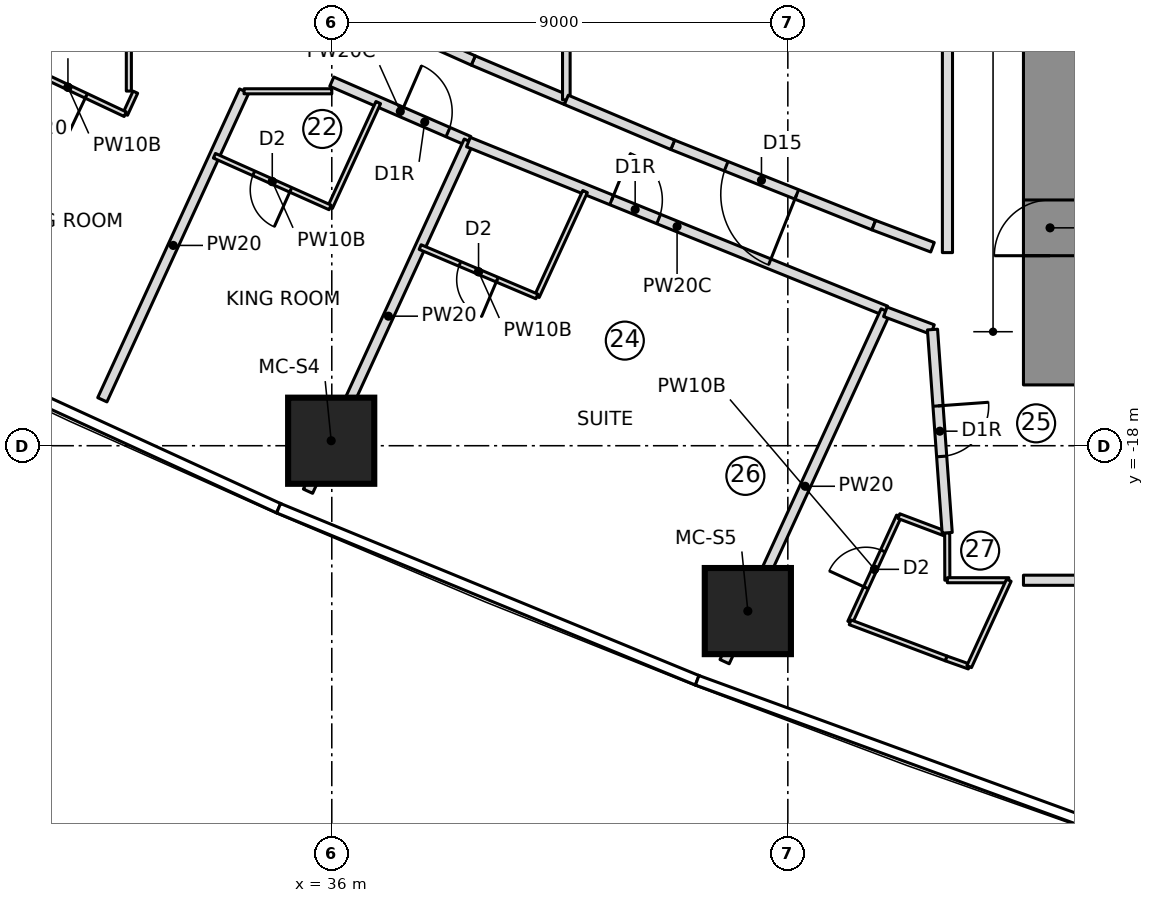
"""IFC4 building model, lengths in metres.
Left out: names, types, materials, properties, quantities, classifications, styles, units other than length and angle.
Written with IfcOpenShell. Run it as: python <this file> out.ifc"""

import sys

from ifc_helpers import new_model, si_unit, direction, frame, frame_2d, origin, origin_2d, place, context, subcontext, project, spatial, rectangle, extrude, element, fill, save


model = new_model("IFC4")
c1 = context("Model", 3, precision=1e-05, world=origin(), true_north=direction((0.0, 1.0)))
c2 = subcontext(c1, "Body", "Model", "MODEL_VIEW")
j1 = project(units=[si_unit("LENGTHUNIT", "METRE"), si_unit("PLANEANGLEUNIT", "RADIAN")], contexts=[c1])
p1 = place(None, origin())
s1 = spatial("IfcSite", under=j1, at=p1, CompositionType="ELEMENT")
p2 = place(p1, origin())
s2 = spatial("IfcBuilding", under=s1, at=p2, CompositionType="ELEMENT")
p3 = place(p2, frame((0.0, 0.0, 88.45)))
s3 = spatial("IfcBuildingStorey", under=s2, at=p3, CompositionType="ELEMENT", Elevation=88.45)
p4 = place(p3, frame((50.175, -16.8, 0.0), z_axis=(0.0, 0.0, 1.0), x_axis=(0.0, 1.0, 0.0)))
e1 = element("IfcWall", 1, at=p4, inside=s3, PredefinedType="SHEAR", context=c2, shape_type="SweptSolid", body=[
    extrude(rectangle(XDim=10.15, YDim=1.05, at=frame_2d((5.075, 0.0))), origin(), (0.0, 0.0, 1.0), 3.55),
])
p5 = place(p4, frame((2.55, 0.0, 0.0)))
e2 = element("IfcOpeningElement", 2, at=p5, cuts=e1, PredefinedType="OPENING", context=c2, shape_type="SweptSolid", body=[
    extrude(rectangle(XDim=1.1, YDim=2.1, at=frame_2d((0.55, 1.05))), frame((0.0, 0.535, 0.0), z_axis=(0.0, -1.0, 0.0), x_axis=(1.0, 0.0, 0.0)), (0.0, 0.0, 1.0), 1.07),
])
for number, where, z_axis, x_axis in (
    (3, (35.988, -17.902, 0.0), (0.0, 0.0, 1.0), (1.0, 0.0, 0.0)),
    (4, (44.211, -21.264, 0.0), (0.0, 0.0, 1.0), (1.0, 0.0, 0.0)),
):
    element("IfcColumn", number, at=place(p3, frame(where, z_axis=z_axis, x_axis=x_axis)), inside=s3, PredefinedType="COLUMN", context=c2, shape_type="SweptSolid", body=[
        extrude(rectangle(XDim=1.7, YDim=1.7, at=origin_2d()), origin(), (0.0, 0.0, 1.0), 3.55),
    ])
p6 = place(p3, frame((27.449, -15.208, 0.0), z_axis=(0.0, 0.0, 1.0), x_axis=(0.417429919618, 0.90870911859, 0.0)))
e5 = element("IfcWall", 5, at=p6, inside=s3, PredefinedType="PARTITIONING", context=c2, shape_type="SweptSolid", body=[
    extrude(rectangle(XDim=7.6, YDim=0.2, at=frame_2d((3.8, 0.0))), origin(), (0.0, 0.0, 1.0), 3.25),
])
p7 = place(p3, frame((32.124, -11.022, 0.0), z_axis=(0.0, 0.0, 1.0), x_axis=(-0.4176025781, -0.908629785316, 0.0)))
e6 = element("IfcWall", 6, at=p7, inside=s3, PredefinedType="PARTITIONING", context=c2, shape_type="SweptSolid", body=[
    extrude(rectangle(XDim=0.479, YDim=0.1, at=frame_2d((0.239, 0.0))), origin(), (0.0, 0.0, 1.0), 3.25),
])
p8 = place(p3, frame((31.924, -11.457, 0.0), z_axis=(0.0, 0.0, 1.0), x_axis=(-0.904688082375, 0.426074493027, 0.0)))
e7 = element("IfcWall", 7, at=p8, inside=s3, PredefinedType="PARTITIONING", context=c2, shape_type="SweptSolid", body=[
    extrude(rectangle(XDim=2.5, YDim=0.1, at=frame_2d((1.25, 0.0))), origin(), (0.0, 0.0, 1.0), 3.25),
])
p9 = place(p8, frame((0.85, 0.0, 0.0)))
e8 = element("IfcOpeningElement", 8, at=p9, cuts=e7, PredefinedType="OPENING", context=c2, shape_type="SweptSolid", body=[
    extrude(rectangle(XDim=0.8, YDim=2.1, at=frame_2d((0.4, 1.05))), frame((0.0, 0.06, 0.0), z_axis=(0.0, -1.0, 0.0), x_axis=(1.0, 0.0, 0.0)), (0.0, 0.0, 1.0), 0.12),
])
p10 = place(p3, frame((31.471, -17.094, 0.0), z_axis=(0.0, 0.0, 1.0), x_axis=(0.417420546123, 0.908713424394, 0.0)))
e9 = element("IfcWall", 9, at=p10, inside=s3, PredefinedType="PARTITIONING", context=c2, shape_type="SweptSolid", body=[
    extrude(rectangle(XDim=6.706, YDim=0.2, at=frame_2d((3.353, 0.0))), origin(), (0.0, 0.0, 1.0), 3.25),
])
p11 = place(p3, frame((36.0, -10.815, 0.0), z_axis=(0.0, 0.0, 1.0), x_axis=(0.917314766234, -0.398162805457, 0.0)))
e10 = element("IfcWall", 10, at=p11, inside=s3, PredefinedType="PARTITIONING", context=c2, shape_type="SweptSolid", body=[
    extrude(rectangle(XDim=2.948, YDim=0.2, at=frame_2d((1.474, 0.0))), origin(), (0.0, 0.0, 1.0), 3.25),
])
p12 = place(p11, frame((1.5, 0.0, 0.0)))
e11 = element("IfcOpeningElement", 11, at=p12, cuts=e10, PredefinedType="OPENING", context=c2, shape_type="SweptSolid", body=[
    extrude(rectangle(XDim=1.0, YDim=2.1, at=frame_2d((0.5, 1.05))), frame((0.0, 0.11, 0.0), z_axis=(0.0, -1.0, 0.0), x_axis=(1.0, 0.0, 0.0)), (0.0, 0.0, 1.0), 0.22),
])
p13 = place(p3, frame((36.917, -11.228, 0.0), z_axis=(0.0, 0.0, 1.0), x_axis=(-0.417378147321, -0.908732899228, 0.0)))
e12 = element("IfcWall", 12, at=p13, inside=s3, PredefinedType="PARTITIONING", context=c2, shape_type="SweptSolid", body=[
    extrude(rectangle(XDim=2.277, YDim=0.1, at=frame_2d((1.139, 0.0))), origin(), (0.0, 0.0, 1.0), 3.25),
])
p14 = place(p3, frame((35.967, -13.297, 0.0), z_axis=(0.0, 0.0, 1.0), x_axis=(-0.913016449487, 0.407922741417, 0.0)))
e13 = element("IfcWall", 13, at=p14, inside=s3, PredefinedType="PARTITIONING", context=c2, shape_type="SweptSolid", body=[
    extrude(rectangle(XDim=2.5, YDim=0.1, at=frame_2d((1.25, 0.0))), origin(), (0.0, 0.0, 1.0), 3.25),
])
p15 = place(p14, frame((0.85, 0.0, 0.0)))
e14 = element("IfcOpeningElement", 14, at=p15, cuts=e13, PredefinedType="OPENING", context=c2, shape_type="SweptSolid", body=[
    extrude(rectangle(XDim=0.8, YDim=2.1, at=frame_2d((0.4, 1.05))), frame((0.0, 0.06, 0.0), z_axis=(0.0, -1.0, 0.0), x_axis=(1.0, 0.0, 0.0)), (0.0, 0.0, 1.0), 0.12),
])
p16 = place(p3, frame((35.531, -18.898, 0.0), z_axis=(0.0, 0.0, 1.0), x_axis=(0.417416334044, 0.908715359215, 0.0)))
e15 = element("IfcWall", 15, at=p16, inside=s3, PredefinedType="PARTITIONING", context=c2, shape_type="SweptSolid", body=[
    extrude(rectangle(XDim=7.604, YDim=0.2, at=frame_2d((3.802, 0.0))), origin(), (0.0, 0.0, 1.0), 3.25),
])
p17 = place(p3, frame((38.696, -12.007, 0.0), z_axis=(0.0, 0.0, 1.0), x_axis=(0.927027566285, -0.374993188401, 0.0)))
e16 = element("IfcWall", 16, at=p17, inside=s3, PredefinedType="PARTITIONING", context=c2, shape_type="SweptSolid", body=[
    extrude(rectangle(XDim=8.885, YDim=0.2, at=frame_2d((4.442, 0.0))), origin(), (0.0, 0.0, 1.0), 3.25),
])
p18 = place(p17, frame((3.05, 0.0, 0.0)))
e17 = element("IfcOpeningElement", 17, at=p18, cuts=e16, PredefinedType="OPENING", context=c2, shape_type="SweptSolid", body=[
    extrude(rectangle(XDim=1.0, YDim=2.1, at=frame_2d((0.5, 1.05))), frame((0.0, 0.11, 0.0), z_axis=(0.0, -1.0, 0.0), x_axis=(1.0, 0.0, 0.0)), (0.0, 0.0, 1.0), 0.22),
])
p19 = place(p3, frame((40.999, -12.984, 0.0), z_axis=(0.0, 0.0, 1.0), x_axis=(-0.417433204355, -0.908707609686, 0.0)))
e18 = element("IfcWall", 18, at=p19, inside=s3, PredefinedType="PARTITIONING", context=c2, shape_type="SweptSolid", body=[
    extrude(rectangle(XDim=2.278, YDim=0.1, at=frame_2d((1.139, 0.0))), origin(), (0.0, 0.0, 1.0), 3.25),
])
p20 = place(p3, frame((40.048, -15.054, 0.0), z_axis=(0.0, 0.0, 1.0), x_axis=(-0.921042675983, 0.38946166566, 0.0)))
e19 = element("IfcWall", 19, at=p20, inside=s3, PredefinedType="PARTITIONING", context=c2, shape_type="SweptSolid", body=[
    extrude(rectangle(XDim=2.501, YDim=0.1, at=frame_2d((1.25, 0.0))), origin(), (0.0, 0.0, 1.0), 3.25),
])
p21 = place(p20, frame((0.85, 0.0, 0.0)))
e20 = element("IfcOpeningElement", 20, at=p21, cuts=e19, PredefinedType="OPENING", context=c2, shape_type="SweptSolid", body=[
    extrude(rectangle(XDim=0.8, YDim=2.1, at=frame_2d((0.4, 1.05))), frame((0.0, 0.06, 0.0), z_axis=(0.0, -1.0, 0.0), x_axis=(1.0, 0.0, 0.0)), (0.0, 0.0, 1.0), 0.12),
])
p22 = place(p3, frame((43.752, -22.262, 0.0), z_axis=(0.0, 0.0, 1.0), x_axis=(0.417437957167, 0.908705426371, 0.0)))
e21 = element("IfcWall", 21, at=p22, inside=s3, PredefinedType="PARTITIONING", context=c2, shape_type="SweptSolid", body=[
    extrude(rectangle(XDim=7.619, YDim=0.2, at=frame_2d((3.81, 0.0))), origin(), (0.0, 0.0, 1.0), 3.25),
])
p23 = place(p3, frame((46.229, -21.485, 0.0), z_axis=(0.0, 0.0, 1.0), x_axis=(0.417405650341, 0.908720266674, 0.0)))
e22 = element("IfcWall", 22, at=p23, inside=s3, PredefinedType="PARTITIONING", context=c2, shape_type="SweptSolid", body=[
    extrude(rectangle(XDim=2.306, YDim=0.1, at=frame_2d((1.153, 0.0))), origin(), (0.0, 0.0, 1.0), 3.25),
])
p24 = place(p23, frame((0.75, 0.0, 0.0)))
e23 = element("IfcOpeningElement", 23, at=p24, cuts=e22, PredefinedType="OPENING", context=c2, shape_type="SweptSolid", body=[
    extrude(rectangle(XDim=0.8, YDim=2.1, at=frame_2d((0.4, 1.05))), frame((0.0, 0.06, 0.0), z_axis=(0.0, -1.0, 0.0), x_axis=(1.0, 0.0, 0.0)), (0.0, 0.0, 1.0), 0.12),
])
p25 = place(p3, frame((47.192, -19.39, 0.0), z_axis=(0.0, 0.0, 1.0), x_axis=(0.935855998994, -0.352382674301, 0.0)))
e24 = element("IfcWall", 24, at=p25, inside=s3, PredefinedType="PARTITIONING", context=c2, shape_type="SweptSolid", body=[
    extrude(rectangle(XDim=0.998, YDim=0.1, at=frame_2d((0.499, 0.0))), origin(), (0.0, 0.0, 1.0), 3.25),
])
p26 = place(p3, frame((48.579, -22.359, 0.0), z_axis=(0.0, 0.0, 1.0), x_axis=(-0.942878458172, 0.333136928476, 0.0)))
e25 = element("IfcWall", 25, at=p26, inside=s3, PredefinedType="PARTITIONING", context=c2, shape_type="SweptSolid", body=[
    extrude(rectangle(XDim=0.484, YDim=0.1, at=frame_2d((0.242, 0.0))), origin(), (0.0, 0.0, 1.0), 3.25),
])
p27 = place(p3, frame((48.123, -22.198, 0.0), z_axis=(0.0, 0.0, 1.0), x_axis=(-0.935872177073, 0.352339705654, 0.0)))
e26 = element("IfcWall", 26, at=p27, inside=s3, PredefinedType="PARTITIONING", context=c2, shape_type="SweptSolid", body=[
    extrude(rectangle(XDim=2.023, YDim=0.1, at=frame_2d((1.012, 0.0))), origin(), (0.0, 0.0, 1.0), 3.25),
])
p28 = place(p3, frame((40.629, -11.174, 0.0), z_axis=(0.0, 0.0, 1.0), x_axis=(-0.92104665064, 0.38945226581, 0.0)))
e27 = element("IfcWall", 27, at=p28, inside=s3, PredefinedType="PARTITIONING", context=c2, shape_type="SweptSolid", body=[
    extrude(rectangle(XDim=1.994, YDim=0.2, at=frame_2d((0.997, 0.0))), origin(), (0.0, 0.0, 1.0), 3.25),
])
p29 = place(p3, frame((38.792, -10.397, 0.0), z_axis=(0.0, 0.0, 1.0), x_axis=(-0.913029587861, 0.407893333716, 0.0)))
e28 = element("IfcWall", 28, at=p29, inside=s3, PredefinedType="PARTITIONING", context=c2, shape_type="SweptSolid", body=[
    extrude(rectangle(XDim=3.058, YDim=0.2, at=frame_2d((1.529, 0.0))), origin(), (0.0, 0.0, 1.0), 3.25),
])
p30 = place(p3, frame((40.629, -11.174, 0.0), z_axis=(0.0, 0.0, 1.0), x_axis=(0.0, 1.0, 0.0)))
e29 = element("IfcWall", 29, at=p30, inside=s3, PredefinedType="PARTITIONING", context=c2, shape_type="SweptSolid", body=[
    extrude(rectangle(XDim=22.348, YDim=0.15, at=frame_2d((11.174, 0.0))), origin(), (0.0, 0.0, 1.0), 3.25),
])
p31 = place(p3, frame((46.696, -13.647, 0.0), z_axis=(0.0, 0.0, 1.0), x_axis=(-0.928638161177, 0.370986745864, 0.0)))
e30 = element("IfcWall", 30, at=p31, inside=s3, PredefinedType="PARTITIONING", context=c2, shape_type="SweptSolid", body=[
    extrude(rectangle(XDim=4.273, YDim=0.2, at=frame_2d((2.136, 0.0))), origin(), (0.0, 0.0, 1.0), 3.25),
])
p32 = place(p31, frame((1.636, 0.0, 0.0)))
e31 = element("IfcOpeningElement", 31, at=p32, cuts=e30, PredefinedType="OPENING", context=c2, shape_type="SweptSolid", body=[
    extrude(rectangle(XDim=1.5, YDim=2.1, at=frame_2d((0.75, 1.05))), frame((0.0, 0.11, 0.0), z_axis=(0.0, -1.0, 0.0), x_axis=(1.0, 0.0, 0.0)), (0.0, 0.0, 1.0), 0.22),
])
p33 = place(p3, frame((42.728, -12.062, 0.0), z_axis=(0.0, 0.0, 1.0), x_axis=(-0.921029334809, 0.38949321486, 0.0)))
e32 = element("IfcWall", 32, at=p33, inside=s3, PredefinedType="PARTITIONING", context=c2, shape_type="SweptSolid", body=[
    extrude(rectangle(XDim=2.279, YDim=0.2, at=frame_2d((1.14, 0.0))), origin(), (0.0, 0.0, 1.0), 3.25),
])
p34 = place(p3, frame((49.65, -20.655, 0.0), z_axis=(0.0, 0.0, 1.0), x_axis=(1.0, 0.0, 0.0)))
e33 = element("IfcWall", 33, at=p34, inside=s3, PredefinedType="PARTITIONING", context=c2, shape_type="SweptSolid", body=[
    extrude(rectangle(XDim=4.976, YDim=0.2, at=frame_2d((2.488, 0.0))), origin(), (0.0, 0.0, 1.0), 3.25),
])
p35 = place(p34, frame((1.988, 0.0, 0.0)))
e34 = element("IfcOpeningElement", 34, at=p35, cuts=e33, PredefinedType="OPENING", context=c2, shape_type="SweptSolid", body=[
    extrude(rectangle(XDim=1.5, YDim=2.1, at=frame_2d((0.75, 1.05))), frame((0.0, 0.11, 0.0), z_axis=(0.0, -1.0, 0.0), x_axis=(1.0, 0.0, 0.0)), (0.0, 0.0, 1.0), 0.22),
])
p36 = place(p3, frame((31.995, -9.054, 0.0), z_axis=(0.0, 0.0, 1.0), x_axis=(0.0, -1.0, 0.0)))
e35 = element("IfcWall", 35, at=p36, inside=s3, PredefinedType="PARTITIONING", context=c2, shape_type="SweptSolid", body=[
    extrude(rectangle(XDim=1.947, YDim=0.1, at=frame_2d((0.973, 0.0))), origin(), (0.0, 0.0, 1.0), 3.25),
])
p37 = place(p3, frame((34.268, -11.005, 0.0), z_axis=(0.0, 0.0, 1.0), x_axis=(1.0, 0.0, 0.0)))
e36 = element("IfcWall", 36, at=p37, inside=s3, PredefinedType="PARTITIONING", context=c2, shape_type="SweptSolid", body=[
    extrude(rectangle(XDim=1.732, YDim=0.1, at=frame_2d((0.866, 0.0))), origin(), (0.0, 0.0, 1.0), 3.25),
])
p38 = place(p3, frame((48.145, -19.719, 0.0), z_axis=(0.0, 0.0, 1.0), x_axis=(0.002870551847, -0.999995879958, 0.0)))
e37 = element("IfcWall", 37, at=p38, inside=s3, PredefinedType="PARTITIONING", context=c2, shape_type="SweptSolid", body=[
    extrude(rectangle(XDim=0.936, YDim=0.1, at=frame_2d((0.468, 0.0))), origin(), (0.0, 0.0, 1.0), 3.25),
])
p39 = place(p3, frame((48.148, -20.654, 0.0), z_axis=(0.0, 0.0, 1.0), x_axis=(0.999999817967, -0.000603378812, 0.0)))
e38 = element("IfcWall", 38, at=p39, inside=s3, PredefinedType="PARTITIONING", context=c2, shape_type="SweptSolid", body=[
    extrude(rectangle(XDim=1.214, YDim=0.1, at=frame_2d((0.607, 0.0))), origin(), (0.0, 0.0, 1.0), 3.25),
])
p40 = place(p3, frame((49.362, -20.655, 0.0), z_axis=(0.0, 0.0, 1.0), x_axis=(-0.417439151459, -0.90870487774, 0.0)))
e39 = element("IfcWall", 39, at=p40, inside=s3, PredefinedType="PARTITIONING", context=c2, shape_type="SweptSolid", body=[
    extrude(rectangle(XDim=1.875, YDim=0.1, at=frame_2d((0.938, 0.0))), origin(), (0.0, 0.0, 1.0), 3.25),
])
p41 = place(p3, frame((46.924, -15.357, 0.0), z_axis=(0.0, 0.0, 1.0), x_axis=(0.935803526171, -0.35252199989, 0.0)))
e40 = element("IfcWall", 40, at=p41, inside=s3, PredefinedType="PARTITIONING", context=c2, shape_type="SweptSolid", body=[
    extrude(rectangle(XDim=0.995, YDim=0.2, at=frame_2d((0.497, 0.0))), origin(), (0.0, 0.0, 1.0), 3.25),
])
p42 = place(p3, frame((47.855, -14.083, 0.0), z_axis=(0.0, 0.0, 1.0), x_axis=(-0.935907269358, 0.352246480696, 0.0)))
e41 = element("IfcWall", 41, at=p42, inside=s3, PredefinedType="PARTITIONING", context=c2, shape_type="SweptSolid", body=[
    extrude(rectangle(XDim=1.239, YDim=0.2, at=frame_2d((0.619, 0.0))), origin(), (0.0, 0.0, 1.0), 3.25),
])
p43 = place(p3, frame((47.855, -15.707, 0.0), z_axis=(0.0, 0.0, 1.0), x_axis=(0.072114108047, -0.997396388313, 0.0)))
e42 = element("IfcWall", 42, at=p43, inside=s3, PredefinedType="PARTITIONING", context=c2, shape_type="SweptSolid", body=[
    extrude(rectangle(XDim=4.022, YDim=0.2, at=frame_2d((2.011, 0.0))), origin(), (0.0, 0.0, 1.0), 3.25),
])
p44 = place(p43, frame((1.511, 0.0, 0.0)))
e43 = element("IfcOpeningElement", 43, at=p44, cuts=e42, PredefinedType="OPENING", context=c2, shape_type="SweptSolid", body=[
    extrude(rectangle(XDim=1.0, YDim=2.1, at=frame_2d((0.5, 1.05))), frame((0.0, 0.11, 0.0), z_axis=(0.0, -1.0, 0.0), x_axis=(1.0, 0.0, 0.0)), (0.0, 0.0, 1.0), 0.22),
])
p45 = place(p3, frame((48.15, 14.189, 0.0), z_axis=(0.0, 0.0, 1.0), x_axis=(0.0, -1.0, 0.0)))
e44 = element("IfcWall", 44, at=p45, inside=s3, PredefinedType="PARTITIONING", context=c2, shape_type="SweptSolid", body=[
    extrude(rectangle(XDim=28.377, YDim=0.2, at=frame_2d((14.189, 0.0))), origin(), (0.0, 0.0, 1.0), 3.25),
])
p46 = place(p9, origin())
e45 = element("IfcDoor", 45, at=p46, inside=s3, OperationType="SINGLE_SWING_LEFT", PredefinedType="DOOR", context=c2, shape_type="SweptSolid", body=[
    extrude(rectangle(XDim=0.8, YDim=2.1, at=frame_2d((0.4, 1.05))), frame((0.0, 0.025, 0.0), z_axis=(0.0, -1.0, 0.0), x_axis=(1.0, 0.0, 0.0)), (0.0, 0.0, 1.0), 0.05),
])
fill(e8, e45)
p47 = place(p15, origin())
e46 = element("IfcDoor", 46, at=p47, inside=s3, OperationType="SINGLE_SWING_LEFT", PredefinedType="DOOR", context=c2, shape_type="SweptSolid", body=[
    extrude(rectangle(XDim=0.8, YDim=2.1, at=frame_2d((0.4, 1.05))), frame((0.0, 0.025, 0.0), z_axis=(0.0, -1.0, 0.0), x_axis=(1.0, 0.0, 0.0)), (0.0, 0.0, 1.0), 0.05),
])
fill(e14, e46)
p48 = place(p12, origin())
e47 = element("IfcDoor", 47, at=p48, inside=s3, OperationType="SINGLE_SWING_RIGHT", PredefinedType="DOOR", context=c2, shape_type="SweptSolid", body=[
    extrude(rectangle(XDim=1.0, YDim=2.1, at=frame_2d((0.5, 1.05))), frame((0.0, 0.025, 0.0), z_axis=(0.0, -1.0, 0.0), x_axis=(1.0, 0.0, 0.0)), (0.0, 0.0, 1.0), 0.05),
])
fill(e11, e47)
p49 = place(p21, origin())
e48 = element("IfcDoor", 48, at=p49, inside=s3, OperationType="SINGLE_SWING_LEFT", PredefinedType="DOOR", context=c2, shape_type="SweptSolid", body=[
    extrude(rectangle(XDim=0.8, YDim=2.1, at=frame_2d((0.4, 1.05))), frame((0.0, 0.025, 0.0), z_axis=(0.0, -1.0, 0.0), x_axis=(1.0, 0.0, 0.0)), (0.0, 0.0, 1.0), 0.05),
])
fill(e20, e48)
p50 = place(p18, origin())
e49 = element("IfcDoor", 49, at=p50, inside=s3, OperationType="SINGLE_SWING_RIGHT", PredefinedType="DOOR", context=c2, shape_type="SweptSolid", body=[
    extrude(rectangle(XDim=1.0, YDim=2.1, at=frame_2d((0.5, 1.05))), frame((0.0, 0.025, 0.0), z_axis=(0.0, -1.0, 0.0), x_axis=(1.0, 0.0, 0.0)), (0.0, 0.0, 1.0), 0.05),
])
fill(e17, e49)
p51 = place(p24, origin())
e50 = element("IfcDoor", 50, at=p51, inside=s3, OperationType="SINGLE_SWING_LEFT", PredefinedType="DOOR", context=c2, shape_type="SweptSolid", body=[
    extrude(rectangle(XDim=0.8, YDim=2.1, at=frame_2d((0.4, 1.05))), frame((0.0, 0.025, 0.0), z_axis=(0.0, -1.0, 0.0), x_axis=(1.0, 0.0, 0.0)), (0.0, 0.0, 1.0), 0.05),
])
fill(e23, e50)
p52 = place(p32, origin())
e51 = element("IfcDoor", 51, at=p52, inside=s3, OperationType="DOUBLE_DOOR_SINGLE_SWING", PredefinedType="DOOR", context=c2, shape_type="SweptSolid", body=[
    extrude(rectangle(XDim=1.5, YDim=2.1, at=frame_2d((0.75, 1.05))), frame((0.0, 0.025, 0.0), z_axis=(0.0, -1.0, 0.0), x_axis=(1.0, 0.0, 0.0)), (0.0, 0.0, 1.0), 0.05),
])
fill(e31, e51)
p53 = place(p44, origin())
e52 = element("IfcDoor", 52, at=p53, inside=s3, OperationType="SINGLE_SWING_RIGHT", PredefinedType="DOOR", context=c2, shape_type="SweptSolid", body=[
    extrude(rectangle(XDim=1.0, YDim=2.1, at=frame_2d((0.5, 1.05))), frame((0.0, 0.025, 0.0), z_axis=(0.0, -1.0, 0.0), x_axis=(1.0, 0.0, 0.0)), (0.0, 0.0, 1.0), 0.05),
])
fill(e43, e52)
p54 = place(p5, origin())
e53 = element("IfcDoor", 53, at=p54, inside=s3, OperationType="SINGLE_SWING_RIGHT", PredefinedType="DOOR", context=c2, shape_type="SweptSolid", body=[
    extrude(rectangle(XDim=1.1, YDim=2.1, at=frame_2d((0.55, 1.05))), frame((0.0, 0.025, 0.0), z_axis=(0.0, -1.0, 0.0), x_axis=(1.0, 0.0, 0.0)), (0.0, 0.0, 1.0), 0.05),
])
fill(e2, e53)
save(model, sys.argv[1])
